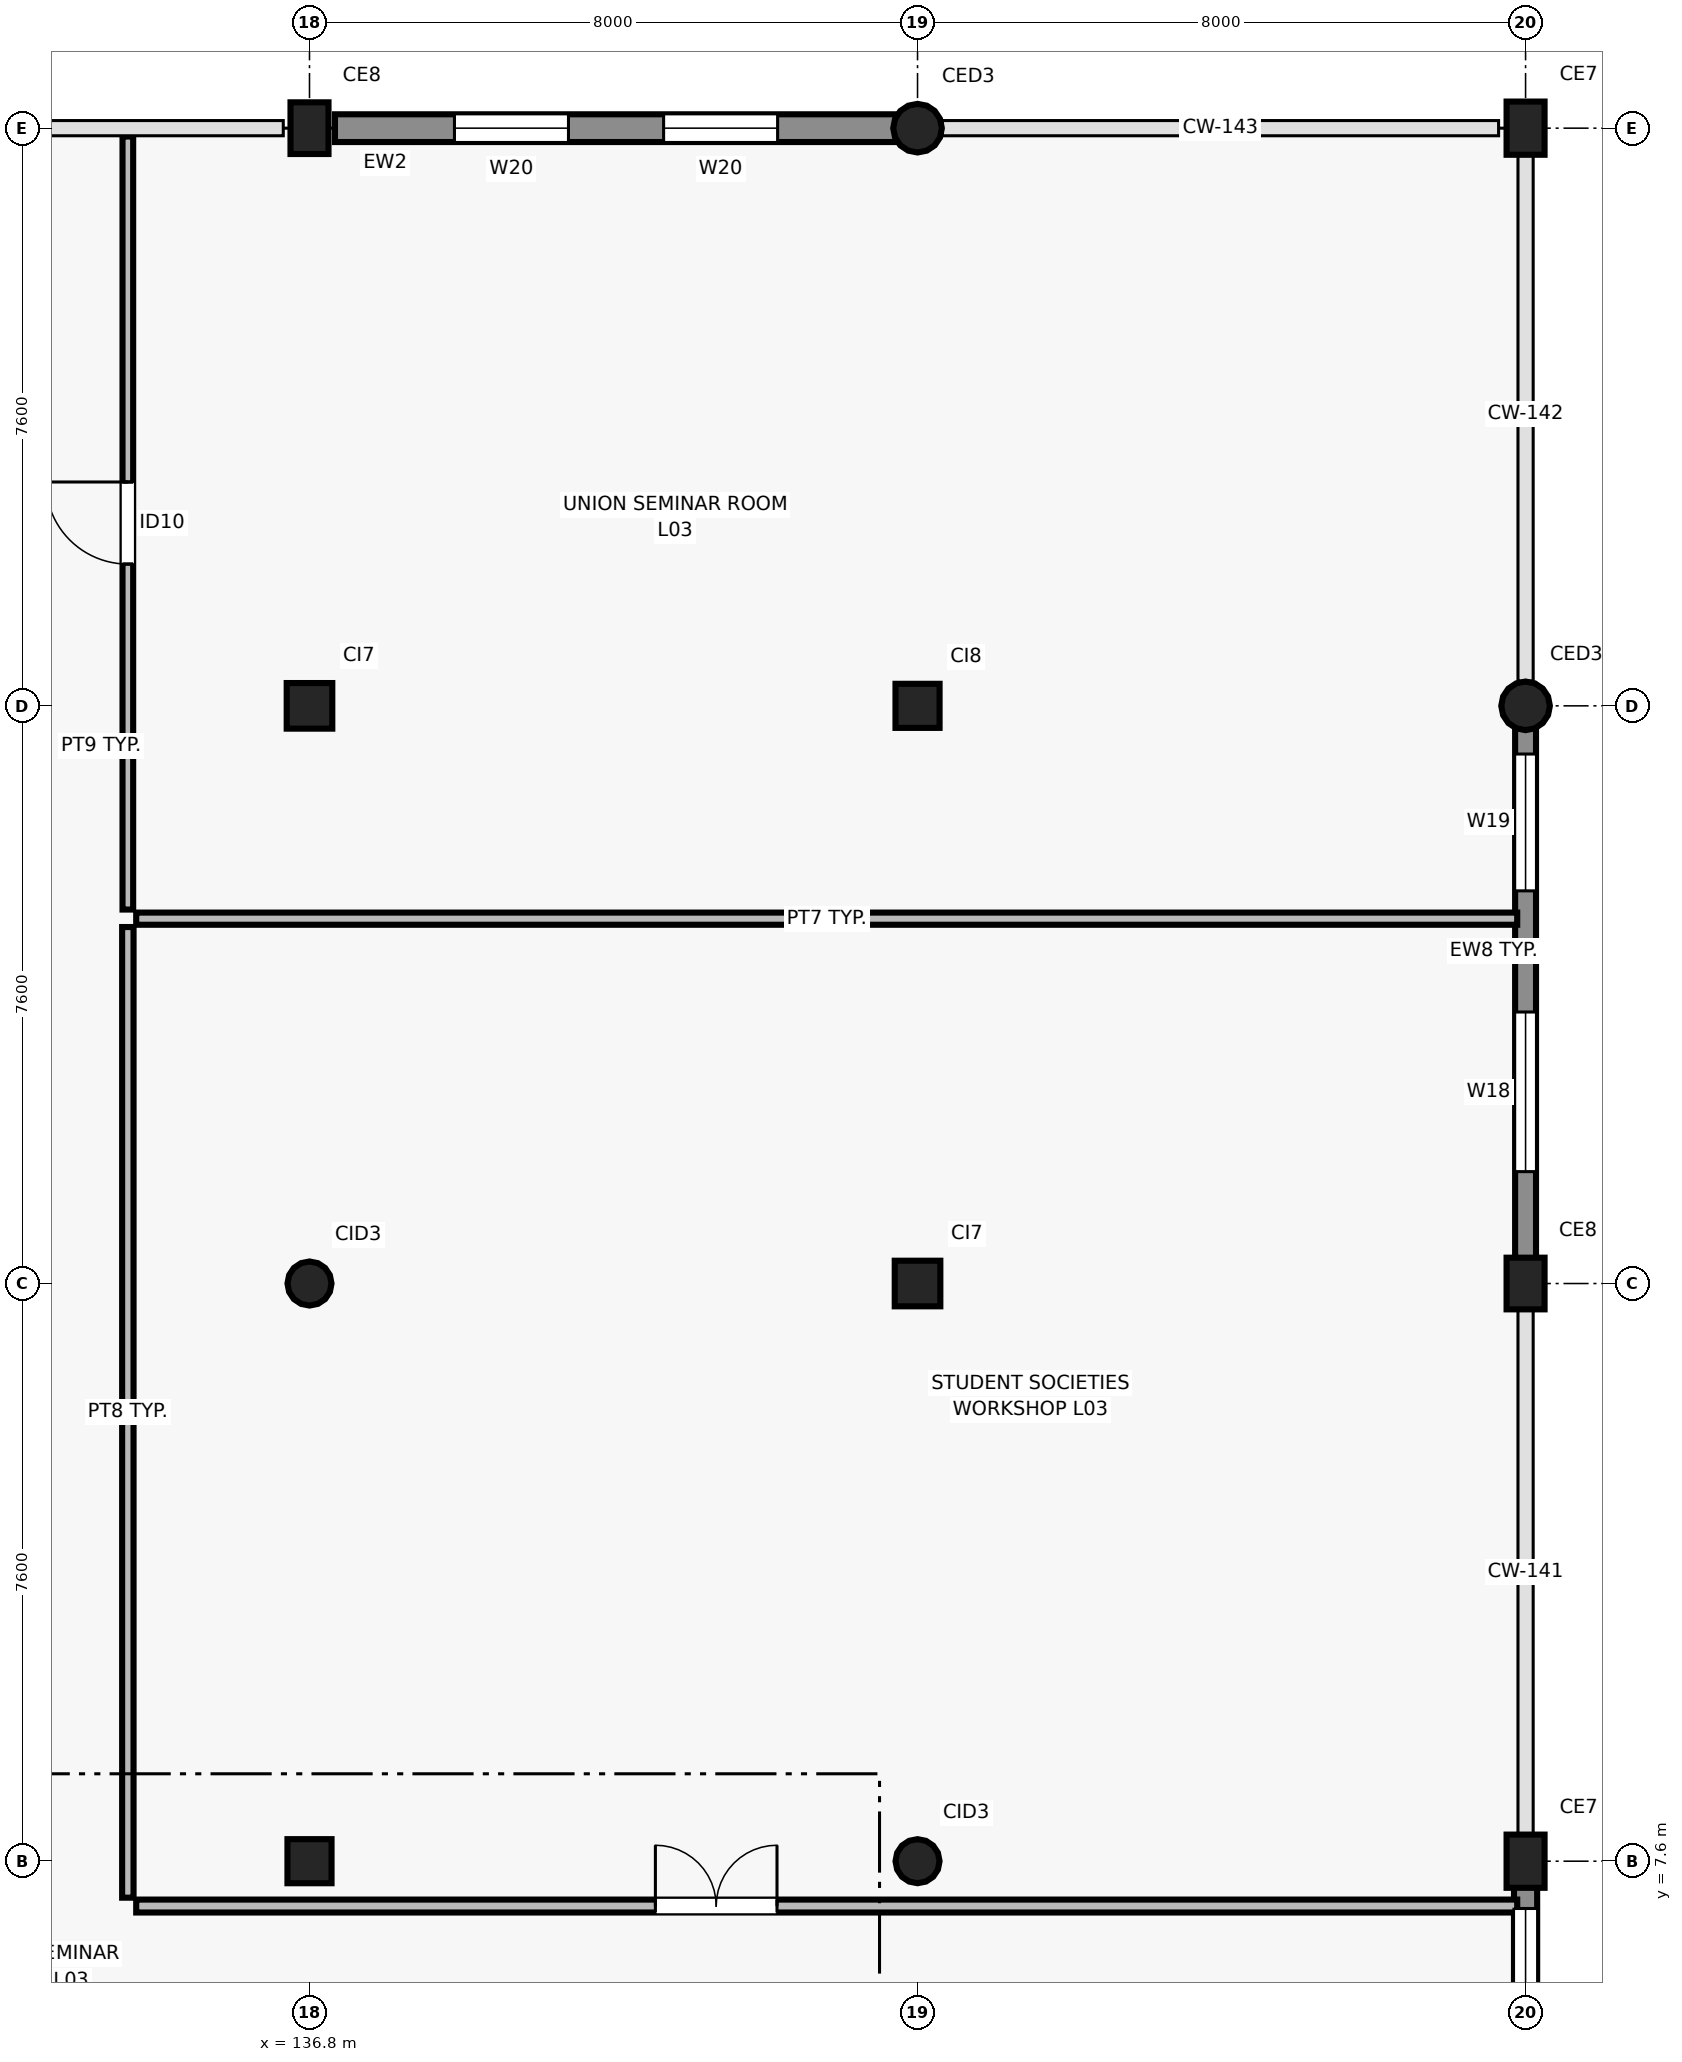
"""IFC4 building model, lengths in metres.
Left out: names, types, materials, properties, quantities, classifications, styles, units other than length and angle.
Written with IfcOpenShell. Run it as: python <this file> out.ifc"""

import sys

from ifc_helpers import new_model, si_unit, direction, frame, frame_2d, origin, origin_2d, place, context, subcontext, project, spatial, rectangle, circle, extrude, element, fill, save


model = new_model("IFC4")
c1 = context("Model", 3, precision=1e-05, world=origin(), true_north=direction((0.0, 1.0)))
c2 = subcontext(c1, "Body", "Model", "MODEL_VIEW")
j1 = project(units=[si_unit("LENGTHUNIT", "METRE"), si_unit("PLANEANGLEUNIT", "RADIAN")], contexts=[c1])
p1 = place(None, origin())
s1 = spatial("IfcSite", under=j1, at=p1, CompositionType="ELEMENT")
p2 = place(p1, origin())
s2 = spatial("IfcBuilding", under=s1, at=p2, CompositionType="ELEMENT")
p3 = place(p2, frame((0.0, 0.0, 13.2)))
s3 = spatial("IfcBuildingStorey", under=s2, at=p3, CompositionType="ELEMENT", Elevation=13.2)
p4 = place(p3, frame((136.8, 7.6, 0.0), z_axis=(0.0, 0.0, 1.0), x_axis=(1.0, 0.0, 0.0)))
e1 = element("IfcColumn", 1, at=p4, inside=s3, PredefinedType="COLUMN", context=c2, shape_type="SweptSolid", body=[
    extrude(rectangle(XDim=0.58, YDim=0.58, at=origin_2d()), origin(), (0.0, 0.0, 1.0), 4.2),
])
p5 = place(p3, frame((136.8, 15.2, 0.0), z_axis=(0.0, 0.0, 1.0), x_axis=(1.0, 0.0, 0.0)))
e2 = element("IfcColumn", 2, at=p5, inside=s3, PredefinedType="COLUMN", context=c2, shape_type="SweptSolid", body=[
    extrude(circle(Radius=0.29, at=origin_2d()), origin(), (0.0, 0.0, 1.0), 4.2),
])
p6 = place(p3, frame((136.8, 22.8, 0.0), z_axis=(0.0, 0.0, 1.0), x_axis=(1.0, 0.0, 0.0)))
e3 = element("IfcColumn", 3, at=p6, inside=s3, PredefinedType="COLUMN", context=c2, shape_type="SweptSolid", body=[
    extrude(rectangle(XDim=0.6, YDim=0.6, at=origin_2d()), origin(), (0.0, 0.0, 1.0), 4.2),
])
p7 = place(p3, frame((136.8, 30.4, 0.0), z_axis=(0.0, 0.0, 1.0), x_axis=(1.0, 0.0, 0.0)))
e4 = element("IfcColumn", 4, at=p7, inside=s3, PredefinedType="COLUMN", context=c2, shape_type="SweptSolid", body=[
    extrude(rectangle(XDim=0.68, YDim=0.5, at=origin_2d()), origin(), (0.0, 0.0, 1.0), 4.2),
])
p8 = place(p3, frame((144.8, 7.6, 0.0), z_axis=(0.0, 0.0, 1.0), x_axis=(1.0, 0.0, 0.0)))
e5 = element("IfcColumn", 5, at=p8, inside=s3, PredefinedType="COLUMN", context=c2, shape_type="SweptSolid", body=[
    extrude(circle(Radius=0.29, at=origin_2d()), origin(), (0.0, 0.0, 1.0), 4.2),
])
p9 = place(p3, frame((144.8, 15.2, 0.0), z_axis=(0.0, 0.0, 1.0), x_axis=(1.0, 0.0, 0.0)))
e6 = element("IfcColumn", 6, at=p9, inside=s3, PredefinedType="COLUMN", context=c2, shape_type="SweptSolid", body=[
    extrude(rectangle(XDim=0.6, YDim=0.6, at=origin_2d()), origin(), (0.0, 0.0, 1.0), 4.2),
])
p10 = place(p3, frame((144.8, 22.8, 0.0), z_axis=(0.0, 0.0, 1.0), x_axis=(1.0, 0.0, 0.0)))
e7 = element("IfcColumn", 7, at=p10, inside=s3, PredefinedType="COLUMN", context=c2, shape_type="SweptSolid", body=[
    extrude(rectangle(XDim=0.58, YDim=0.58, at=origin_2d()), origin(), (0.0, 0.0, 1.0), 4.2),
])
p11 = place(p3, frame((144.8, 30.4, 0.0), z_axis=(0.0, 0.0, 1.0), x_axis=(1.0, 0.0, 0.0)))
e8 = element("IfcColumn", 8, at=p11, inside=s3, PredefinedType="COLUMN", context=c2, shape_type="SweptSolid", body=[
    extrude(circle(Radius=0.32, at=origin_2d()), origin(), (0.0, 0.0, 1.0), 4.2),
])
p12 = place(p3, frame((152.8, 7.6, 0.0), z_axis=(0.0, 0.0, 1.0), x_axis=(1.0, 0.0, 0.0)))
e9 = element("IfcColumn", 9, at=p12, inside=s3, PredefinedType="COLUMN", context=c2, shape_type="SweptSolid", body=[
    extrude(rectangle(XDim=0.7, YDim=0.5, at=origin_2d()), origin(), (0.0, 0.0, 1.0), 4.2),
])
p13 = place(p3, frame((152.8, 15.2, 0.0), z_axis=(0.0, 0.0, 1.0), x_axis=(1.0, 0.0, 0.0)))
e10 = element("IfcColumn", 10, at=p13, inside=s3, PredefinedType="COLUMN", context=c2, shape_type="SweptSolid", body=[
    extrude(rectangle(XDim=0.68, YDim=0.5, at=origin_2d()), origin(), (0.0, 0.0, 1.0), 4.2),
])
p14 = place(p3, frame((152.8, 22.8, 0.0), z_axis=(0.0, 0.0, 1.0), x_axis=(1.0, 0.0, 0.0)))
e11 = element("IfcColumn", 11, at=p14, inside=s3, PredefinedType="COLUMN", context=c2, shape_type="SweptSolid", body=[
    extrude(circle(Radius=0.32, at=origin_2d()), origin(), (0.0, 0.0, 1.0), 4.2),
])
p15 = place(p3, frame((152.8, 30.4, 0.0), z_axis=(0.0, 0.0, 1.0), x_axis=(1.0, 0.0, 0.0)))
e12 = element("IfcColumn", 12, at=p15, inside=s3, PredefinedType="COLUMN", context=c2, shape_type="SweptSolid", body=[
    extrude(rectangle(XDim=0.7, YDim=0.5, at=origin_2d()), origin(), (0.0, 0.0, 1.0), 4.2),
])
p16 = place(p3, frame((152.8, 0.269, 0.0), z_axis=(0.0, 0.0, 1.0), x_axis=(0.0, 1.0, 0.0)))
e13 = element("IfcWall", 13, at=p16, inside=s3, PredefinedType="SOLIDWALL", context=c2, shape_type="SweptSolid", body=[
    extrude(rectangle(XDim=7.086, YDim=0.305, at=frame_2d((3.543, 0.0))), origin(), (0.0, 0.0, 1.0), 3.34),
])
p17 = place(p16, frame((1.366, 0.0, 0.9)))
e14 = element("IfcOpeningElement", 14, at=p17, cuts=e13, PredefinedType="OPENING", context=c2, shape_type="SweptSolid", body=[
    extrude(rectangle(XDim=1.2, YDim=1.5, at=frame_2d((0.6, 0.75))), frame((0.0, 0.162, 0.0), z_axis=(0.0, -1.0, 0.0), x_axis=(1.0, 0.0, 0.0)), (0.0, 0.0, 1.0), 0.325),
])
p18 = place(p16, frame((4.309, 0.0, 0.9)))
e15 = element("IfcOpeningElement", 15, at=p18, cuts=e13, PredefinedType="OPENING", context=c2, shape_type="SweptSolid", body=[
    extrude(rectangle(XDim=2.4, YDim=1.25, at=frame_2d((1.2, 0.625))), frame((0.0, 0.162, 0.0), z_axis=(0.0, -1.0, 0.0), x_axis=(1.0, 0.0, 0.0)), (0.0, 0.0, 1.0), 0.325),
])
p19 = place(p3, frame((152.8, 15.445, 0.0), z_axis=(0.0, 0.0, 1.0), x_axis=(0.0, 1.0, 0.0)))
e16 = element("IfcWall", 16, at=p19, inside=s3, PredefinedType="SOLIDWALL", context=c2, shape_type="SweptSolid", body=[
    extrude(rectangle(XDim=7.086, YDim=0.275, at=frame_2d((3.543, 0.0))), origin(), (0.0, 0.0, 1.0), 3.44),
])
p20 = place(p19, frame((1.227, 0.0, 0.9)))
e17 = element("IfcOpeningElement", 17, at=p20, cuts=e16, PredefinedType="OPENING", context=c2, shape_type="SweptSolid", body=[
    extrude(rectangle(XDim=2.1, YDim=1.25, at=frame_2d((1.05, 0.625))), frame((0.0, 0.147, 0.0), z_axis=(0.0, -1.0, 0.0), x_axis=(1.0, 0.0, 0.0)), (0.0, 0.0, 1.0), 0.295),
])
p21 = place(p19, frame((4.921, 0.0, 0.9)))
e18 = element("IfcOpeningElement", 18, at=p21, cuts=e16, PredefinedType="OPENING", context=c2, shape_type="SweptSolid", body=[
    extrude(rectangle(XDim=1.8, YDim=1.25, at=frame_2d((0.9, 0.625))), frame((0.0, 0.147, 0.0), z_axis=(0.0, -1.0, 0.0), x_axis=(1.0, 0.0, 0.0)), (0.0, 0.0, 1.0), 0.295),
])
p22 = place(p3, frame((144.531, 30.4, 0.0), z_axis=(0.0, 0.0, 1.0), x_axis=(-1.0, 0.0, 0.0)))
e19 = element("IfcWall", 19, at=p22, inside=s3, PredefinedType="SOLIDWALL", context=c2, shape_type="SweptSolid", body=[
    extrude(rectangle(XDim=7.396, YDim=0.365, at=frame_2d((3.698, 0.0))), origin(), (0.0, 0.0, 1.0), 3.36),
])
p23 = place(p22, frame((1.572, 0.0, 0.9)))
e20 = element("IfcOpeningElement", 20, at=p23, cuts=e19, PredefinedType="OPENING", context=c2, shape_type="SweptSolid", body=[
    extrude(rectangle(XDim=1.5, YDim=1.25, at=frame_2d((0.75, 0.625))), frame((0.0, 0.192, 0.0), z_axis=(0.0, -1.0, 0.0), x_axis=(1.0, 0.0, 0.0)), (0.0, 0.0, 1.0), 0.385),
])
p24 = place(p22, frame((4.324, 0.0, 0.9)))
e21 = element("IfcOpeningElement", 21, at=p24, cuts=e19, PredefinedType="OPENING", context=c2, shape_type="SweptSolid", body=[
    extrude(rectangle(XDim=1.5, YDim=1.25, at=frame_2d((0.75, 0.625))), frame((0.0, 0.192, 0.0), z_axis=(0.0, -1.0, 0.0), x_axis=(1.0, 0.0, 0.0)), (0.0, 0.0, 1.0), 0.385),
])
p25 = place(p3, frame((134.52, 7.01, 0.0), z_axis=(0.0, 0.0, 1.0), x_axis=(1.0, 0.0, 0.0)))
e22 = element("IfcWall", 22, at=p25, inside=s3, PredefinedType="PARTITIONING", context=c2, shape_type="SweptSolid", body=[
    extrude(rectangle(XDim=18.17, YDim=0.17, at=frame_2d((9.085, 0.0))), origin(), (0.0, 0.0, 1.0), 3.9),
])
p26 = place(p25, frame((6.831, 0.0, 0.0)))
e23 = element("IfcOpeningElement", 23, at=p26, cuts=e22, PredefinedType="OPENING", context=c2, shape_type="SweptSolid", body=[
    extrude(rectangle(XDim=1.6, YDim=2.25, at=frame_2d((0.8, 1.125))), frame((0.0, 0.095, 0.0), z_axis=(0.0, -1.0, 0.0), x_axis=(1.0, 0.0, 0.0)), (0.0, 0.0, 1.0), 0.19),
])
p27 = place(p3, frame((134.52, 20.0, 0.0), z_axis=(0.0, 0.0, 1.0), x_axis=(1.0, 0.0, 0.0)))
e24 = element("IfcWall", 24, at=p27, inside=s3, PredefinedType="PARTITIONING", context=c2, shape_type="SweptSolid", body=[
    extrude(rectangle(XDim=18.17, YDim=0.16, at=frame_2d((9.085, 0.0))), origin(), (0.0, 0.0, 1.0), 3.9),
])
p28 = place(p3, frame((134.41, 7.12, 0.0), z_axis=(0.0, 0.0, 1.0), x_axis=(0.0, 1.0, 0.0)))
e25 = element("IfcWall", 25, at=p28, inside=s3, PredefinedType="PARTITIONING", context=c2, shape_type="SweptSolid", body=[
    extrude(rectangle(XDim=12.77, YDim=0.15, at=frame_2d((6.385, 0.0))), origin(), (0.0, 0.0, 1.0), 3.9),
])
p29 = place(p3, frame((134.41, 20.12, 0.0), z_axis=(0.0, 0.0, 1.0), x_axis=(0.0, 1.0, 0.0)))
e26 = element("IfcWall", 26, at=p29, inside=s3, PredefinedType="PARTITIONING", context=c2, shape_type="SweptSolid", body=[
    extrude(rectangle(XDim=10.17, YDim=0.14, at=frame_2d((5.085, 0.0))), origin(), (0.0, 0.0, 1.0), 3.9),
])
p30 = place(p29, frame((4.545, 0.0, 0.0)))
e27 = element("IfcOpeningElement", 27, at=p30, cuts=e26, PredefinedType="OPENING", context=c2, shape_type="SweptSolid", body=[
    extrude(rectangle(XDim=1.08, YDim=2.15, at=frame_2d((0.54, 1.075))), frame((0.0, 0.08, 0.0), z_axis=(0.0, -1.0, 0.0), x_axis=(1.0, 0.0, 0.0)), (0.0, 0.0, 1.0), 0.16),
])
p31 = place(p18, origin())
e28 = element("IfcWindow", 28, at=p31, inside=s3, PartitioningType="SINGLE_PANEL", PredefinedType="WINDOW", context=c2, shape_type="SweptSolid", body=[
    extrude(rectangle(XDim=2.4, YDim=1.25, at=frame_2d((1.2, 0.625))), frame((0.0, 0.03, 0.0), z_axis=(0.0, -1.0, 0.0), x_axis=(1.0, 0.0, 0.0)), (0.0, 0.0, 1.0), 0.06),
])
fill(e15, e28)
p32 = place(p20, origin())
e29 = element("IfcWindow", 29, at=p32, inside=s3, PartitioningType="SINGLE_PANEL", PredefinedType="WINDOW", context=c2, shape_type="SweptSolid", body=[
    extrude(rectangle(XDim=2.1, YDim=1.25, at=frame_2d((1.05, 0.625))), frame((0.0, 0.03, 0.0), z_axis=(0.0, -1.0, 0.0), x_axis=(1.0, 0.0, 0.0)), (0.0, 0.0, 1.0), 0.06),
])
fill(e17, e29)
p33 = place(p21, origin())
e30 = element("IfcWindow", 30, at=p33, inside=s3, PartitioningType="SINGLE_PANEL", PredefinedType="WINDOW", context=c2, shape_type="SweptSolid", body=[
    extrude(rectangle(XDim=1.8, YDim=1.25, at=frame_2d((0.9, 0.625))), frame((0.0, 0.03, 0.0), z_axis=(0.0, -1.0, 0.0), x_axis=(1.0, 0.0, 0.0)), (0.0, 0.0, 1.0), 0.06),
])
fill(e18, e30)
p34 = place(p23, origin())
e31 = element("IfcWindow", 31, at=p34, inside=s3, PartitioningType="SINGLE_PANEL", PredefinedType="WINDOW", context=c2, shape_type="SweptSolid", body=[
    extrude(rectangle(XDim=1.5, YDim=1.25, at=frame_2d((0.75, 0.625))), frame((0.0, 0.03, 0.0), z_axis=(0.0, -1.0, 0.0), x_axis=(1.0, 0.0, 0.0)), (0.0, 0.0, 1.0), 0.06),
])
fill(e20, e31)
p35 = place(p24, origin())
e32 = element("IfcWindow", 32, at=p35, inside=s3, PartitioningType="SINGLE_PANEL", PredefinedType="WINDOW", context=c2, shape_type="SweptSolid", body=[
    extrude(rectangle(XDim=1.5, YDim=1.25, at=frame_2d((0.75, 0.625))), frame((0.0, 0.03, 0.0), z_axis=(0.0, -1.0, 0.0), x_axis=(1.0, 0.0, 0.0)), (0.0, 0.0, 1.0), 0.06),
])
fill(e21, e32)
p36 = place(p26, origin())
e33 = element("IfcDoor", 33, at=p36, inside=s3, OperationType="DOUBLE_DOOR_SINGLE_SWING", PredefinedType="DOOR", context=c2, shape_type="SweptSolid", body=[
    extrude(rectangle(XDim=1.6, YDim=2.25, at=frame_2d((0.8, 1.125))), frame((0.0, 0.025, 0.0), z_axis=(0.0, -1.0, 0.0), x_axis=(1.0, 0.0, 0.0)), (0.0, 0.0, 1.0), 0.05),
])
fill(e23, e33)
p37 = place(p30, origin())
e34 = element("IfcDoor", 34, at=p37, inside=s3, OperationType="SINGLE_SWING_RIGHT", PredefinedType="DOOR", context=c2, shape_type="SweptSolid", body=[
    extrude(rectangle(XDim=1.08, YDim=2.15, at=frame_2d((0.54, 1.075))), frame((0.0, 0.025, 0.0), z_axis=(0.0, -1.0, 0.0), x_axis=(1.0, 0.0, 0.0)), (0.0, 0.0, 1.0), 0.05),
])
fill(e27, e34)
save(model, sys.argv[1])
